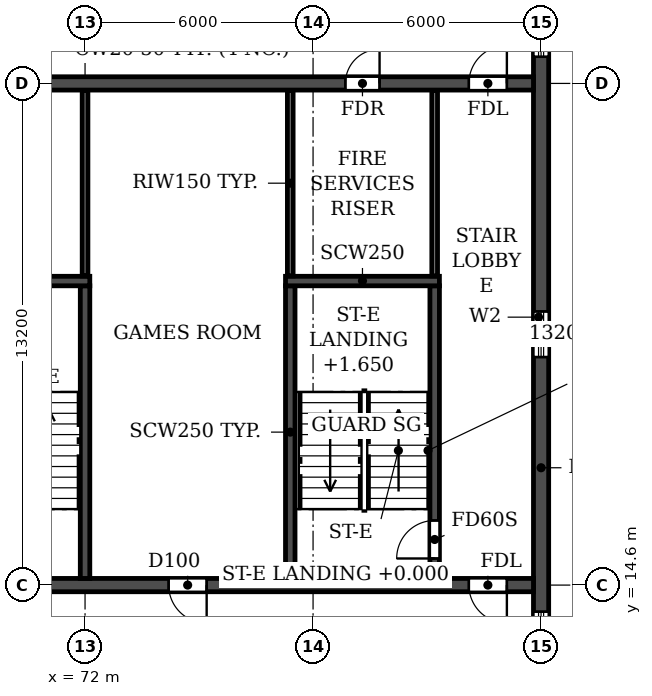
"""IFC4 building model, lengths in metres.
Left out: names, types, materials, properties, quantities, classifications, styles, units other than length and angle.
Written with IfcOpenShell. Run it as: python <this file> out.ifc"""

import sys

from ifc_helpers import new_model, si_unit, direction, frame, frame_2d, origin, place, context, subcontext, project, spatial, rectangle, extrude, element, fill, save


model = new_model("IFC4")
c1 = context("Model", 3, precision=1e-05, world=origin(), true_north=direction((0.0, 1.0)))
c2 = subcontext(c1, "Body", "Model", "MODEL_VIEW")
j1 = project(units=[si_unit("LENGTHUNIT", "METRE"), si_unit("PLANEANGLEUNIT", "RADIAN")], contexts=[c1])
p1 = place(None, origin())
s1 = spatial("IfcSite", under=j1, at=p1, CompositionType="ELEMENT")
p2 = place(p1, origin())
s2 = spatial("IfcBuilding", under=s1, at=p2, CompositionType="ELEMENT")
p3 = place(p2, frame((0.0, 0.0, 231.3)))
s3 = spatial("IfcBuildingStorey", under=s2, at=p3, CompositionType="ELEMENT", Elevation=231.3)
p4 = place(p3, frame((84.0, 4.683, 0.0), z_axis=(0.0, 0.0, 1.0), x_axis=(0.0, 1.0, 0.0)))
e1 = element("IfcWall", 1, at=p4, inside=s3, PredefinedType="SHEAR", context=c2, shape_type="SweptSolid", body=[
    extrude(rectangle(XDim=31.834, YDim=0.4, at=frame_2d((15.917, 0.0))), origin(), (0.0, 0.0, 1.0), 3.08),
])
p5 = place(p4, frame((23.817, 0.0, 0.9)))
e2 = element("IfcOpeningElement", 2, at=p5, cuts=e1, PredefinedType="OPENING", context=c2, shape_type="SweptSolid", body=[
    extrude(rectangle(XDim=1.2, YDim=1.5, at=frame_2d((0.6, 0.75))), frame((0.0, 0.21, 0.0), z_axis=(0.0, -1.0, 0.0), x_axis=(1.0, 0.0, 0.0)), (0.0, 0.0, 1.0), 0.42),
])
p6 = place(p4, frame((8.017, 0.0, 0.9)))
e3 = element("IfcOpeningElement", 3, at=p6, cuts=e1, PredefinedType="OPENING", context=c2, shape_type="SweptSolid", body=[
    extrude(rectangle(XDim=1.2, YDim=1.5, at=frame_2d((0.6, 0.75))), frame((0.0, 0.21, 0.0), z_axis=(0.0, -1.0, 0.0), x_axis=(1.0, 0.0, 0.0)), (0.0, 0.0, 1.0), 0.42),
])
p7 = place(p4, frame((27.694, 0.0, 0.6)))
e4 = element("IfcOpeningElement", 4, at=p7, cuts=e1, PredefinedType="OPENING", context=c2, shape_type="SweptSolid", body=[
    extrude(rectangle(XDim=2.2, YDim=1.8, at=frame_2d((1.1, 0.9))), frame((0.0, 0.21, 0.0), z_axis=(0.0, -1.0, 0.0), x_axis=(1.0, 0.0, 0.0)), (0.0, 0.0, 1.0), 0.42),
])
p8 = place(p4, frame((2.541, 0.0, 0.6)))
e5 = element("IfcOpeningElement", 5, at=p8, cuts=e1, PredefinedType="OPENING", context=c2, shape_type="SweptSolid", body=[
    extrude(rectangle(XDim=2.2, YDim=1.8, at=frame_2d((1.1, 0.9))), frame((0.0, 0.21, 0.0), z_axis=(0.0, -1.0, 0.0), x_axis=(1.0, 0.0, 0.0)), (0.0, 0.0, 1.0), 0.42),
])
p9 = place(p4, frame((15.917, 0.0, 0.9)))
e6 = element("IfcOpeningElement", 6, at=p9, cuts=e1, PredefinedType="OPENING", context=c2, shape_type="SweptSolid", body=[
    extrude(rectangle(XDim=1.2, YDim=1.5, at=frame_2d((0.6, 0.75))), frame((0.0, 0.21, 0.0), z_axis=(0.0, -1.0, 0.0), x_axis=(1.0, 0.0, 0.0)), (0.0, 0.0, 1.0), 0.42),
])
p10 = place(p3, frame((18.2, 14.6, 0.0), z_axis=(0.0, 0.0, 1.0), x_axis=(1.0, 0.0, 0.0)))
e7 = element("IfcWall", 7, at=p10, inside=s3, PredefinedType="SOLIDWALL", context=c2, shape_type="SweptSolid", body=[
    extrude(rectangle(XDim=65.6, YDim=0.35, at=frame_2d((32.8, 0.0))), origin(), (0.0, 0.0, 1.0), 3.08),
])
p11 = place(p10, frame((0.7, 0.0, 0.0)))
e8 = element("IfcOpeningElement", 8, at=p11, cuts=e7, PredefinedType="OPENING", context=c2, shape_type="SweptSolid", body=[
    extrude(rectangle(XDim=1.0, YDim=2.1, at=frame_2d((0.5, 1.05))), frame((0.0, 0.185, 0.0), z_axis=(0.0, -1.0, 0.0), x_axis=(1.0, 0.0, 0.0)), (0.0, 0.0, 1.0), 0.37),
])
p12 = place(p10, frame((8.6, 0.0, 0.0)))
e9 = element("IfcOpeningElement", 9, at=p12, cuts=e7, PredefinedType="OPENING", context=c2, shape_type="SweptSolid", body=[
    extrude(rectangle(XDim=1.0, YDim=2.1, at=frame_2d((0.5, 1.05))), frame((0.0, 0.185, 0.0), z_axis=(0.0, -1.0, 0.0), x_axis=(1.0, 0.0, 0.0)), (0.0, 0.0, 1.0), 0.37),
])
p13 = place(p10, frame((13.2, 0.0, 0.0)))
e10 = element("IfcOpeningElement", 10, at=p13, cuts=e7, PredefinedType="OPENING", context=c2, shape_type="SweptSolid", body=[
    extrude(rectangle(XDim=1.0, YDim=2.1, at=frame_2d((0.5, 1.05))), frame((0.0, 0.185, 0.0), z_axis=(0.0, -1.0, 0.0), x_axis=(1.0, 0.0, 0.0)), (0.0, 0.0, 1.0), 0.37),
])
p14 = place(p10, frame((24.5, 0.0, 0.0)))
e11 = element("IfcOpeningElement", 11, at=p14, cuts=e7, PredefinedType="OPENING", context=c2, shape_type="SweptSolid", body=[
    extrude(rectangle(XDim=1.0, YDim=2.1, at=frame_2d((0.5, 1.05))), frame((0.0, 0.185, 0.0), z_axis=(0.0, -1.0, 0.0), x_axis=(1.0, 0.0, 0.0)), (0.0, 0.0, 1.0), 0.37),
])
p15 = place(p10, frame((28.4, 0.0, 0.0)))
e12 = element("IfcOpeningElement", 12, at=p15, cuts=e7, PredefinedType="OPENING", context=c2, shape_type="SweptSolid", body=[
    extrude(rectangle(XDim=1.0, YDim=2.1, at=frame_2d((0.5, 1.05))), frame((0.0, 0.185, 0.0), z_axis=(0.0, -1.0, 0.0), x_axis=(1.0, 0.0, 0.0)), (0.0, 0.0, 1.0), 0.37),
])
p16 = place(p10, frame((32.3, 0.0, 0.0)))
e13 = element("IfcOpeningElement", 13, at=p16, cuts=e7, PredefinedType="OPENING", context=c2, shape_type="SweptSolid", body=[
    extrude(rectangle(XDim=1.0, YDim=2.1, at=frame_2d((0.5, 1.05))), frame((0.0, 0.185, 0.0), z_axis=(0.0, -1.0, 0.0), x_axis=(1.0, 0.0, 0.0)), (0.0, 0.0, 1.0), 0.37),
])
p17 = place(p10, frame((36.2, 0.0, 0.0)))
e14 = element("IfcOpeningElement", 14, at=p17, cuts=e7, PredefinedType="OPENING", context=c2, shape_type="SweptSolid", body=[
    extrude(rectangle(XDim=1.0, YDim=2.1, at=frame_2d((0.5, 1.05))), frame((0.0, 0.185, 0.0), z_axis=(0.0, -1.0, 0.0), x_axis=(1.0, 0.0, 0.0)), (0.0, 0.0, 1.0), 0.37),
])
p18 = place(p10, frame((40.1, 0.0, 0.0)))
e15 = element("IfcOpeningElement", 15, at=p18, cuts=e7, PredefinedType="OPENING", context=c2, shape_type="SweptSolid", body=[
    extrude(rectangle(XDim=1.0, YDim=2.1, at=frame_2d((0.5, 1.05))), frame((0.0, 0.185, 0.0), z_axis=(0.0, -1.0, 0.0), x_axis=(1.0, 0.0, 0.0)), (0.0, 0.0, 1.0), 0.37),
])
p19 = place(p10, frame((51.4, 0.0, 0.0)))
e16 = element("IfcOpeningElement", 16, at=p19, cuts=e7, PredefinedType="OPENING", context=c2, shape_type="SweptSolid", body=[
    extrude(rectangle(XDim=1.0, YDim=2.1, at=frame_2d((0.5, 1.05))), frame((0.0, 0.185, 0.0), z_axis=(0.0, -1.0, 0.0), x_axis=(1.0, 0.0, 0.0)), (0.0, 0.0, 1.0), 0.37),
])
p20 = place(p10, frame((56.0, 0.0, 0.0)))
e17 = element("IfcOpeningElement", 17, at=p20, cuts=e7, PredefinedType="OPENING", context=c2, shape_type="SweptSolid", body=[
    extrude(rectangle(XDim=1.0, YDim=2.1, at=frame_2d((0.5, 1.05))), frame((0.0, 0.185, 0.0), z_axis=(0.0, -1.0, 0.0), x_axis=(1.0, 0.0, 0.0)), (0.0, 0.0, 1.0), 0.37),
])
p21 = place(p10, frame((63.9, 0.0, 0.0)))
e18 = element("IfcOpeningElement", 18, at=p21, cuts=e7, PredefinedType="OPENING", context=c2, shape_type="SweptSolid", body=[
    extrude(rectangle(XDim=1.0, YDim=2.1, at=frame_2d((0.5, 1.05))), frame((0.0, 0.185, 0.0), z_axis=(0.0, -1.0, 0.0), x_axis=(1.0, 0.0, 0.0)), (0.0, 0.0, 1.0), 0.37),
])
p22 = place(p3, frame((18.2, 27.8, 0.0), z_axis=(0.0, 0.0, 1.0), x_axis=(1.0, 0.0, 0.0)))
e19 = element("IfcWall", 19, at=p22, inside=s3, PredefinedType="SOLIDWALL", context=c2, shape_type="SweptSolid", body=[
    extrude(rectangle(XDim=65.6, YDim=0.35, at=frame_2d((32.8, 0.0))), origin(), (0.0, 0.0, 1.0), 3.08),
])
p23 = place(p22, frame((0.7, 0.0, 0.0)))
e20 = element("IfcOpeningElement", 20, at=p23, cuts=e19, PredefinedType="OPENING", context=c2, shape_type="SweptSolid", body=[
    extrude(rectangle(XDim=1.0, YDim=2.1, at=frame_2d((0.5, 1.05))), frame((0.0, 0.185, 0.0), z_axis=(0.0, -1.0, 0.0), x_axis=(1.0, 0.0, 0.0)), (0.0, 0.0, 1.0), 0.37),
])
p24 = place(p22, frame((4.05, 0.0, 0.0)))
e21 = element("IfcOpeningElement", 21, at=p24, cuts=e19, PredefinedType="OPENING", context=c2, shape_type="SweptSolid", body=[
    extrude(rectangle(XDim=0.9, YDim=2.1, at=frame_2d((0.45, 1.05))), frame((0.0, 0.185, 0.0), z_axis=(0.0, -1.0, 0.0), x_axis=(1.0, 0.0, 0.0)), (0.0, 0.0, 1.0), 0.37),
])
p25 = place(p22, frame((13.25, 0.0, 0.0)))
e22 = element("IfcOpeningElement", 22, at=p25, cuts=e19, PredefinedType="OPENING", context=c2, shape_type="SweptSolid", body=[
    extrude(rectangle(XDim=0.9, YDim=2.1, at=frame_2d((0.45, 1.05))), frame((0.0, 0.185, 0.0), z_axis=(0.0, -1.0, 0.0), x_axis=(1.0, 0.0, 0.0)), (0.0, 0.0, 1.0), 0.37),
])
p26 = place(p22, frame((16.4, 0.0, 0.0)))
e23 = element("IfcOpeningElement", 23, at=p26, cuts=e19, PredefinedType="OPENING", context=c2, shape_type="SweptSolid", body=[
    extrude(rectangle(XDim=1.0, YDim=2.1, at=frame_2d((0.5, 1.05))), frame((0.0, 0.185, 0.0), z_axis=(0.0, -1.0, 0.0), x_axis=(1.0, 0.0, 0.0)), (0.0, 0.0, 1.0), 0.37),
])
p27 = place(p22, frame((21.6, 0.0, 0.0)))
e24 = element("IfcOpeningElement", 24, at=p27, cuts=e19, PredefinedType="OPENING", context=c2, shape_type="SweptSolid", body=[
    extrude(rectangle(XDim=1.0, YDim=2.1, at=frame_2d((0.5, 1.05))), frame((0.0, 0.185, 0.0), z_axis=(0.0, -1.0, 0.0), x_axis=(1.0, 0.0, 0.0)), (0.0, 0.0, 1.0), 0.37),
])
p28 = place(p22, frame((29.4, 0.0, 0.0)))
e25 = element("IfcOpeningElement", 25, at=p28, cuts=e19, PredefinedType="OPENING", context=c2, shape_type="SweptSolid", body=[
    extrude(rectangle(XDim=1.0, YDim=2.1, at=frame_2d((0.5, 1.05))), frame((0.0, 0.185, 0.0), z_axis=(0.0, -1.0, 0.0), x_axis=(1.0, 0.0, 0.0)), (0.0, 0.0, 1.0), 0.37),
])
p29 = place(p22, frame((32.3, 0.0, 0.0)))
e26 = element("IfcOpeningElement", 26, at=p29, cuts=e19, PredefinedType="OPENING", context=c2, shape_type="SweptSolid", body=[
    extrude(rectangle(XDim=1.0, YDim=2.1, at=frame_2d((0.5, 1.05))), frame((0.0, 0.185, 0.0), z_axis=(0.0, -1.0, 0.0), x_axis=(1.0, 0.0, 0.0)), (0.0, 0.0, 1.0), 0.37),
])
p30 = place(p22, frame((35.2, 0.0, 0.0)))
e27 = element("IfcOpeningElement", 27, at=p30, cuts=e19, PredefinedType="OPENING", context=c2, shape_type="SweptSolid", body=[
    extrude(rectangle(XDim=1.0, YDim=2.1, at=frame_2d((0.5, 1.05))), frame((0.0, 0.185, 0.0), z_axis=(0.0, -1.0, 0.0), x_axis=(1.0, 0.0, 0.0)), (0.0, 0.0, 1.0), 0.37),
])
p31 = place(p22, frame((37.8, 0.0, 0.0)))
e28 = element("IfcOpeningElement", 28, at=p31, cuts=e19, PredefinedType="OPENING", context=c2, shape_type="SweptSolid", body=[
    extrude(rectangle(XDim=1.0, YDim=2.1, at=frame_2d((0.5, 1.05))), frame((0.0, 0.185, 0.0), z_axis=(0.0, -1.0, 0.0), x_axis=(1.0, 0.0, 0.0)), (0.0, 0.0, 1.0), 0.37),
])
p32 = place(p22, frame((40.4, 0.0, 0.0)))
e29 = element("IfcOpeningElement", 29, at=p32, cuts=e19, PredefinedType="OPENING", context=c2, shape_type="SweptSolid", body=[
    extrude(rectangle(XDim=1.0, YDim=2.1, at=frame_2d((0.5, 1.05))), frame((0.0, 0.185, 0.0), z_axis=(0.0, -1.0, 0.0), x_axis=(1.0, 0.0, 0.0)), (0.0, 0.0, 1.0), 0.37),
])
p33 = place(p22, frame((43.0, 0.0, 0.0)))
e30 = element("IfcOpeningElement", 30, at=p33, cuts=e19, PredefinedType="OPENING", context=c2, shape_type="SweptSolid", body=[
    extrude(rectangle(XDim=1.0, YDim=2.1, at=frame_2d((0.5, 1.05))), frame((0.0, 0.185, 0.0), z_axis=(0.0, -1.0, 0.0), x_axis=(1.0, 0.0, 0.0)), (0.0, 0.0, 1.0), 0.37),
])
p34 = place(p22, frame((45.6, 0.0, 0.0)))
e31 = element("IfcOpeningElement", 31, at=p34, cuts=e19, PredefinedType="OPENING", context=c2, shape_type="SweptSolid", body=[
    extrude(rectangle(XDim=1.0, YDim=2.1, at=frame_2d((0.5, 1.05))), frame((0.0, 0.185, 0.0), z_axis=(0.0, -1.0, 0.0), x_axis=(1.0, 0.0, 0.0)), (0.0, 0.0, 1.0), 0.37),
])
p35 = place(p22, frame((48.2, 0.0, 0.0)))
e32 = element("IfcOpeningElement", 32, at=p35, cuts=e19, PredefinedType="OPENING", context=c2, shape_type="SweptSolid", body=[
    extrude(rectangle(XDim=1.0, YDim=2.1, at=frame_2d((0.5, 1.05))), frame((0.0, 0.185, 0.0), z_axis=(0.0, -1.0, 0.0), x_axis=(1.0, 0.0, 0.0)), (0.0, 0.0, 1.0), 0.37),
])
p36 = place(p22, frame((51.45, 0.0, 0.0)))
e33 = element("IfcOpeningElement", 33, at=p36, cuts=e19, PredefinedType="OPENING", context=c2, shape_type="SweptSolid", body=[
    extrude(rectangle(XDim=0.9, YDim=2.1, at=frame_2d((0.45, 1.05))), frame((0.0, 0.185, 0.0), z_axis=(0.0, -1.0, 0.0), x_axis=(1.0, 0.0, 0.0)), (0.0, 0.0, 1.0), 0.37),
])
p37 = place(p22, frame((60.65, 0.0, 0.0)))
e34 = element("IfcOpeningElement", 34, at=p37, cuts=e19, PredefinedType="OPENING", context=c2, shape_type="SweptSolid", body=[
    extrude(rectangle(XDim=0.9, YDim=2.1, at=frame_2d((0.45, 1.05))), frame((0.0, 0.185, 0.0), z_axis=(0.0, -1.0, 0.0), x_axis=(1.0, 0.0, 0.0)), (0.0, 0.0, 1.0), 0.37),
])
p38 = place(p22, frame((63.9, 0.0, 0.0)))
e35 = element("IfcOpeningElement", 35, at=p38, cuts=e19, PredefinedType="OPENING", context=c2, shape_type="SweptSolid", body=[
    extrude(rectangle(XDim=1.0, YDim=2.1, at=frame_2d((0.5, 1.05))), frame((0.0, 0.185, 0.0), z_axis=(0.0, -1.0, 0.0), x_axis=(1.0, 0.0, 0.0)), (0.0, 0.0, 1.0), 0.37),
])
p39 = place(p3, frame((72.0, 14.775, 0.0), z_axis=(0.0, 0.0, 1.0), x_axis=(0.0, 1.0, 0.0)))
e36 = element("IfcWall", 36, at=p39, inside=s3, PredefinedType="SOLIDWALL", context=c2, shape_type="SweptSolid", body=[
    extrude(rectangle(XDim=7.7, YDim=0.25, at=frame_2d((3.85, 0.0))), origin(), (0.0, 0.0, 1.0), 3.08),
])
p40 = place(p3, frame((68.075, 22.6, 0.0), z_axis=(0.0, 0.0, 1.0), x_axis=(1.0, 0.0, 0.0)))
e37 = element("IfcWall", 37, at=p40, inside=s3, PredefinedType="SOLIDWALL", context=c2, shape_type="SweptSolid", body=[
    extrude(rectangle(XDim=4.05, YDim=0.25, at=frame_2d((2.025, 0.0))), origin(), (0.0, 0.0, 1.0), 3.08),
])
p41 = place(p3, frame((77.4, 14.775, 0.0), z_axis=(0.0, 0.0, 1.0), x_axis=(0.0, 1.0, 0.0)))
e38 = element("IfcWall", 38, at=p41, inside=s3, PredefinedType="SOLIDWALL", context=c2, shape_type="SweptSolid", body=[
    extrude(rectangle(XDim=7.7, YDim=0.25, at=frame_2d((3.85, 0.0))), origin(), (0.0, 0.0, 1.0), 3.08),
])
p42 = place(p3, frame((81.2, 14.775, 0.0), z_axis=(0.0, 0.0, 1.0), x_axis=(0.0, 1.0, 0.0)))
e39 = element("IfcWall", 39, at=p42, inside=s3, PredefinedType="SOLIDWALL", context=c2, shape_type="SweptSolid", body=[
    extrude(rectangle(XDim=7.7, YDim=0.25, at=frame_2d((3.85, 0.0))), origin(), (0.0, 0.0, 1.0), 3.08),
])
p43 = place(p42, frame((0.525, 0.0, 0.0)))
e40 = element("IfcOpeningElement", 40, at=p43, cuts=e39, PredefinedType="OPENING", context=c2, shape_type="SweptSolid", body=[
    extrude(rectangle(XDim=1.0, YDim=2.1, at=frame_2d((0.5, 1.05))), frame((0.0, 0.135, 0.0), z_axis=(0.0, -1.0, 0.0), x_axis=(1.0, 0.0, 0.0)), (0.0, 0.0, 1.0), 0.27),
])
p44 = place(p3, frame((77.275, 22.6, 0.0), z_axis=(0.0, 0.0, 1.0), x_axis=(1.0, 0.0, 0.0)))
e41 = element("IfcWall", 41, at=p44, inside=s3, PredefinedType="SOLIDWALL", context=c2, shape_type="SweptSolid", body=[
    extrude(rectangle(XDim=4.05, YDim=0.25, at=frame_2d((2.025, 0.0))), origin(), (0.0, 0.0, 1.0), 3.08),
])
for number, where, z_axis, x_axis in (
    (42, (72.0, 22.735, 0.0), (0.0, 0.0, 1.0), (0.0, 1.0, 0.0)),
    (43, (77.4, 22.735, 0.0), (0.0, 0.0, 1.0), (0.0, 1.0, 0.0)),
    (44, (81.2, 22.735, 0.0), (0.0, 0.0, 1.0), (0.0, 1.0, 0.0)),
):
    element("IfcWall", number, at=place(p3, frame(where, z_axis=z_axis, x_axis=x_axis)), inside=s3, PredefinedType="PARTITIONING", context=c2, shape_type="SweptSolid", body=[
        extrude(rectangle(XDim=4.88, YDim=0.15, at=frame_2d((2.44, 0.0))), origin(), (0.0, 0.0, 1.0), 3.08),
    ])
p45 = place(p5, origin())
e45 = element("IfcWindow", 45, at=p45, inside=s3, PartitioningType="SINGLE_PANEL", PredefinedType="WINDOW", context=c2, shape_type="SweptSolid", body=[
    extrude(rectangle(XDim=1.2, YDim=1.5, at=frame_2d((0.6, 0.75))), frame((0.0, 0.03, 0.0), z_axis=(0.0, -1.0, 0.0), x_axis=(1.0, 0.0, 0.0)), (0.0, 0.0, 1.0), 0.06),
])
fill(e2, e45)
p46 = place(p6, origin())
e46 = element("IfcWindow", 46, at=p46, inside=s3, PartitioningType="SINGLE_PANEL", PredefinedType="WINDOW", context=c2, shape_type="SweptSolid", body=[
    extrude(rectangle(XDim=1.2, YDim=1.5, at=frame_2d((0.6, 0.75))), frame((0.0, 0.03, 0.0), z_axis=(0.0, -1.0, 0.0), x_axis=(1.0, 0.0, 0.0)), (0.0, 0.0, 1.0), 0.06),
])
fill(e3, e46)
p47 = place(p9, origin())
e47 = element("IfcWindow", 47, at=p47, inside=s3, PartitioningType="SINGLE_PANEL", PredefinedType="WINDOW", context=c2, shape_type="SweptSolid", body=[
    extrude(rectangle(XDim=1.2, YDim=1.5, at=frame_2d((0.6, 0.75))), frame((0.0, 0.03, 0.0), z_axis=(0.0, -1.0, 0.0), x_axis=(1.0, 0.0, 0.0)), (0.0, 0.0, 1.0), 0.06),
])
fill(e6, e47)
p48 = place(p37, origin())
e48 = element("IfcDoor", 48, at=p48, inside=s3, OperationType="SINGLE_SWING_RIGHT", PredefinedType="DOOR", context=c2, shape_type="SweptSolid", body=[
    extrude(rectangle(XDim=0.9, YDim=2.1, at=frame_2d((0.45, 1.05))), frame((0.0, 0.025, 0.0), z_axis=(0.0, -1.0, 0.0), x_axis=(1.0, 0.0, 0.0)), (0.0, 0.0, 1.0), 0.05),
])
fill(e34, e48)
p49 = place(p38, origin())
e49 = element("IfcDoor", 49, at=p49, inside=s3, OperationType="SINGLE_SWING_RIGHT", PredefinedType="DOOR", context=c2, shape_type="SweptSolid", body=[
    extrude(rectangle(XDim=1.0, YDim=2.1, at=frame_2d((0.5, 1.05))), frame((0.0, 0.025, 0.0), z_axis=(0.0, -1.0, 0.0), x_axis=(1.0, 0.0, 0.0)), (0.0, 0.0, 1.0), 0.05),
])
fill(e35, e49)
p50 = place(p20, frame((1.0, 0.0, 0.0), z_axis=(0.0, 0.0, 1.0), x_axis=(-1.0, 0.0, 0.0)))
e50 = element("IfcDoor", 50, at=p50, inside=s3, OperationType="SINGLE_SWING_LEFT", PredefinedType="DOOR", context=c2, shape_type="SweptSolid", body=[
    extrude(rectangle(XDim=1.0, YDim=2.1, at=frame_2d((0.5, 1.05))), frame((0.0, 0.025, 0.0), z_axis=(0.0, -1.0, 0.0), x_axis=(1.0, 0.0, 0.0)), (0.0, 0.0, 1.0), 0.05),
])
fill(e17, e50)
p51 = place(p21, frame((1.0, 0.0, 0.0), z_axis=(0.0, 0.0, 1.0), x_axis=(-1.0, 0.0, 0.0)))
e51 = element("IfcDoor", 51, at=p51, inside=s3, OperationType="SINGLE_SWING_LEFT", PredefinedType="DOOR", context=c2, shape_type="SweptSolid", body=[
    extrude(rectangle(XDim=1.0, YDim=2.1, at=frame_2d((0.5, 1.05))), frame((0.0, 0.025, 0.0), z_axis=(0.0, -1.0, 0.0), x_axis=(1.0, 0.0, 0.0)), (0.0, 0.0, 1.0), 0.05),
])
fill(e18, e51)
p52 = place(p43, origin())
e52 = element("IfcDoor", 52, at=p52, inside=s3, OperationType="SINGLE_SWING_LEFT", PredefinedType="DOOR", context=c2, shape_type="SweptSolid", body=[
    extrude(rectangle(XDim=1.0, YDim=2.1, at=frame_2d((0.5, 1.05))), frame((0.0, 0.025, 0.0), z_axis=(0.0, -1.0, 0.0), x_axis=(1.0, 0.0, 0.0)), (0.0, 0.0, 1.0), 0.05),
])
fill(e40, e52)
save(model, sys.argv[1])
